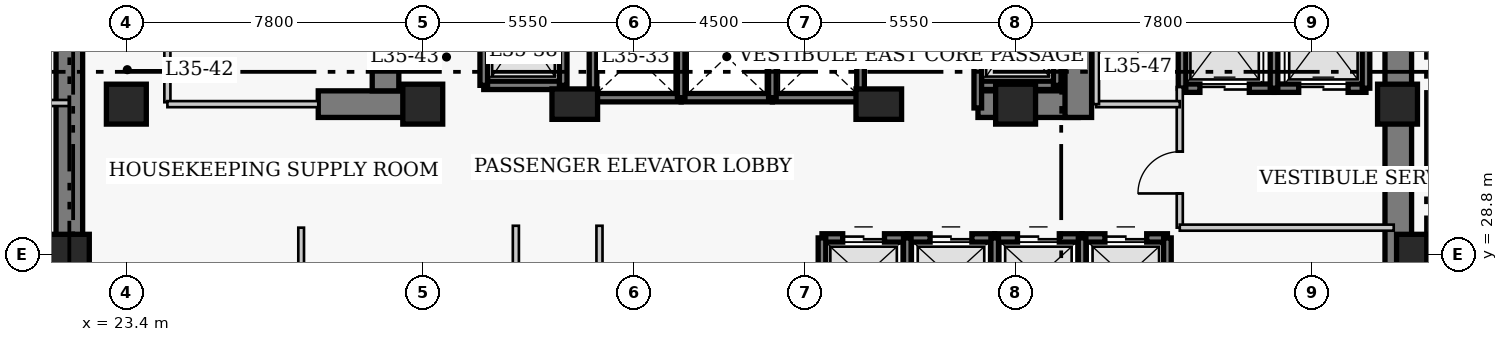
"""IFC4 building model, lengths in metres.
Left out: names, types, materials, properties, quantities, classifications, styles, units other than length and angle.
Written with IfcOpenShell. Run it as: python <this file> out.ifc"""

import sys

from ifc_helpers import new_model, si_unit, direction, frame, frame_2d, origin, origin_2d, place, context, subcontext, project, spatial, rectangle, extrude, element, fill, save


model = new_model("IFC4")
c1 = context("Model", 3, precision=1e-05, world=origin(), true_north=direction((0.0, 1.0)))
c2 = subcontext(c1, "Body", "Model", "MODEL_VIEW")
j1 = project(units=[si_unit("LENGTHUNIT", "METRE"), si_unit("PLANEANGLEUNIT", "RADIAN")], contexts=[c1])
p1 = place(None, origin())
s1 = spatial("IfcSite", under=j1, at=p1, CompositionType="ELEMENT")
p2 = place(p1, origin())
s2 = spatial("IfcBuilding", under=s1, at=p2, CompositionType="ELEMENT")
p3 = place(p2, frame((0.0, 0.0, 142.2)))
s3 = spatial("IfcBuildingStorey", under=s2, at=p3, CompositionType="ELEMENT", Elevation=142.2)
for number, where, z_axis, x_axis in (
    (1, (21.9, 27.05, 0.0), (0.0, 0.0, 1.0), (0.0, 1.0, 0.0)),
    (2, (56.87, 27.05, 0.0), (0.0, 0.0, 1.0), (0.0, 1.0, 0.0)),
):
    element("IfcWall", number, at=place(p3, frame(where, z_axis=z_axis, x_axis=x_axis)), inside=s3, PredefinedType="SHEAR", context=c2, shape_type="SweptSolid", body=[
        extrude(rectangle(XDim=13.62, YDim=0.7, at=frame_2d((6.81, 0.0))), origin(), (0.0, 0.0, 1.0), 3.8),
    ])
p4 = place(p3, frame((28.45, 32.75, 0.0), z_axis=(0.0, 0.0, 1.0), x_axis=(1.0, 0.0, 0.0)))
e3 = element("IfcWall", 3, at=p4, inside=s3, PredefinedType="SHEAR", context=c2, shape_type="SweptSolid", body=[
    extrude(rectangle(XDim=2.4, YDim=0.7, at=frame_2d((1.2, 0.0))), origin(), (0.0, 0.0, 1.0), 3.8),
])
p5 = place(p3, frame((45.81, 32.75, 0.0), z_axis=(0.0, 0.0, 1.0), x_axis=(1.0, 0.0, 0.0)))
e4 = element("IfcWall", 4, at=p5, inside=s3, PredefinedType="SHEAR", context=c2, shape_type="SweptSolid", body=[
    extrude(rectangle(XDim=2.64, YDim=0.7, at=frame_2d((1.32, 0.0))), origin(), (0.0, 0.0, 1.0), 3.8),
])
p6 = place(p3, frame((30.22, 33.1, 0.0), z_axis=(0.0, 0.0, 1.0), x_axis=(0.0, 1.0, 0.0)))
e5 = element("IfcWall", 5, at=p6, inside=s3, PredefinedType="SHEAR", context=c2, shape_type="SweptSolid", body=[
    extrude(rectangle(XDim=7.22, YDim=0.7, at=frame_2d((3.61, 0.0))), origin(), (0.0, 0.0, 1.0), 3.8),
])
p7 = place(p3, frame((48.45, 32.4, 0.0), z_axis=(0.0, 0.0, 1.0), x_axis=(0.0, 1.0, 0.0)))
e6 = element("IfcWall", 6, at=p7, inside=s3, PredefinedType="SHEAR", context=c2, shape_type="SweptSolid", body=[
    extrude(rectangle(XDim=7.92, YDim=0.7, at=frame_2d((3.96, 0.0))), origin(), (0.0, 0.0, 1.0), 3.8),
])
p8 = place(p7, frame((5.8, 0.0, 0.0)))
e7 = element("IfcOpeningElement", 7, at=p8, cuts=e6, PredefinedType="OPENING", context=c2, shape_type="SweptSolid", body=[
    extrude(rectangle(XDim=1.1, YDim=2.15, at=frame_2d((0.55, 1.075))), frame((0.0, 0.36, 0.0), z_axis=(0.0, -1.0, 0.0), x_axis=(1.0, 0.0, 0.0)), (0.0, 0.0, 1.0), 0.72),
])
for number, where, z_axis, x_axis in (
    (8, (21.9, 28.8, 0.0), (0.0, 0.0, 1.0), (1.0, 0.0, 0.0)),
    (9, (57.35, 28.8, 0.0), (0.0, 0.0, 1.0), (1.0, 0.0, 0.0)),
    (10, (23.4, 32.75, 0.0), (0.0, 0.0, 1.0), (1.0, 0.0, 0.0)),
    (11, (31.2, 32.75, 0.0), (0.0, 0.0, 1.0), (1.0, 0.0, 0.0)),
):
    element("IfcColumn", number, at=place(p3, frame(where, z_axis=z_axis, x_axis=x_axis)), inside=s3, PredefinedType="COLUMN", context=c2, shape_type="SweptSolid", body=[
        extrude(rectangle(XDim=1.05, YDim=1.05, at=origin_2d()), origin(), (0.0, 0.0, 1.0), 3.8),
    ])
for number, where, z_axis, x_axis in (
    (12, (35.2, 32.75, 0.0), (0.0, 0.0, 1.0), (1.0, 0.0, 0.0)),
    (13, (43.2, 32.75, 0.0), (0.0, 0.0, 1.0), (1.0, 0.0, 0.0)),
):
    element("IfcColumn", number, at=place(p3, frame(where, z_axis=z_axis, x_axis=x_axis)), inside=s3, PredefinedType="COLUMN", context=c2, shape_type="SweptSolid", body=[
        extrude(rectangle(XDim=1.2, YDim=0.8, at=origin_2d()), origin(), (0.0, 0.0, 1.0), 3.8),
    ])
for number, where, z_axis, x_axis in (
    (14, (46.8, 32.75, 0.0), (0.0, 0.0, 1.0), (1.0, 0.0, 0.0)),
    (15, (56.85, 32.75, 0.0), (0.0, 0.0, 1.0), (1.0, 0.0, 0.0)),
):
    element("IfcColumn", number, at=place(p3, frame(where, z_axis=z_axis, x_axis=x_axis)), inside=s3, PredefinedType="COLUMN", context=c2, shape_type="SweptSolid", body=[
        extrude(rectangle(XDim=1.05, YDim=1.05, at=origin_2d()), origin(), (0.0, 0.0, 1.0), 3.8),
    ])
p9 = place(p3, frame((41.705, 29.23, 0.0), z_axis=(0.0, 0.0, 1.0), x_axis=(1.0, 0.0, 0.0)))
e16 = element("IfcWall", 16, at=p9, inside=s3, PredefinedType="SHEAR", context=c2, shape_type="SweptSolid", body=[
    extrude(rectangle(XDim=2.245, YDim=0.22, at=frame_2d((1.123, 0.0))), origin(), (0.0, 0.0, 1.0), 3.8),
])
p10 = place(p9, frame((0.545, 0.0, 0.0)))
e17 = element("IfcOpeningElement", 17, at=p10, cuts=e16, PredefinedType="OPENING", context=c2, shape_type="SweptSolid", body=[
    extrude(rectangle(XDim=1.1, YDim=2.15, at=frame_2d((0.55, 1.075))), frame((0.0, 0.12, 0.0), z_axis=(0.0, -1.0, 0.0), x_axis=(1.0, 0.0, 0.0)), (0.0, 0.0, 1.0), 0.24),
])
p11 = place(p3, frame((41.705, 27.17, 0.0), z_axis=(0.0, 0.0, 1.0), x_axis=(0.0, 1.0, 0.0)))
e18 = element("IfcWall", 18, at=p11, inside=s3, PredefinedType="SHEAR", context=c2, shape_type="SweptSolid", body=[
    extrude(rectangle(XDim=2.06, YDim=0.2, at=frame_2d((1.03, 0.0))), origin(), (0.0, 0.0, 1.0), 3.8),
])
p12 = place(p3, frame((43.95, 29.23, 0.0), z_axis=(0.0, 0.0, 1.0), x_axis=(1.0, 0.0, 0.0)))
e19 = element("IfcWall", 19, at=p12, inside=s3, PredefinedType="SHEAR", context=c2, shape_type="SweptSolid", body=[
    extrude(rectangle(XDim=2.3, YDim=0.22, at=frame_2d((1.15, 0.0))), origin(), (0.0, 0.0, 1.0), 3.8),
])
p13 = place(p12, frame((0.6, 0.0, 0.0)))
e20 = element("IfcOpeningElement", 20, at=p13, cuts=e19, PredefinedType="OPENING", context=c2, shape_type="SweptSolid", body=[
    extrude(rectangle(XDim=1.1, YDim=2.15, at=frame_2d((0.55, 1.075))), frame((0.0, 0.12, 0.0), z_axis=(0.0, -1.0, 0.0), x_axis=(1.0, 0.0, 0.0)), (0.0, 0.0, 1.0), 0.24),
])
p14 = place(p3, frame((43.95, 27.17, 0.0), z_axis=(0.0, 0.0, 1.0), x_axis=(0.0, 1.0, 0.0)))
e21 = element("IfcWall", 21, at=p14, inside=s3, PredefinedType="SHEAR", context=c2, shape_type="SweptSolid", body=[
    extrude(rectangle(XDim=2.06, YDim=0.2, at=frame_2d((1.03, 0.0))), origin(), (0.0, 0.0, 1.0), 3.8),
])
p15 = place(p3, frame((46.25, 29.23, 0.0), z_axis=(0.0, 0.0, 1.0), x_axis=(1.0, 0.0, 0.0)))
e22 = element("IfcWall", 22, at=p15, inside=s3, PredefinedType="SHEAR", context=c2, shape_type="SweptSolid", body=[
    extrude(rectangle(XDim=2.3, YDim=0.22, at=frame_2d((1.15, 0.0))), origin(), (0.0, 0.0, 1.0), 3.8),
])
p16 = place(p15, frame((0.6, 0.0, 0.0)))
e23 = element("IfcOpeningElement", 23, at=p16, cuts=e22, PredefinedType="OPENING", context=c2, shape_type="SweptSolid", body=[
    extrude(rectangle(XDim=1.1, YDim=2.15, at=frame_2d((0.55, 1.075))), frame((0.0, 0.12, 0.0), z_axis=(0.0, -1.0, 0.0), x_axis=(1.0, 0.0, 0.0)), (0.0, 0.0, 1.0), 0.24),
])
p17 = place(p3, frame((46.25, 27.17, 0.0), z_axis=(0.0, 0.0, 1.0), x_axis=(0.0, 1.0, 0.0)))
e24 = element("IfcWall", 24, at=p17, inside=s3, PredefinedType="SHEAR", context=c2, shape_type="SweptSolid", body=[
    extrude(rectangle(XDim=2.06, YDim=0.2, at=frame_2d((1.03, 0.0))), origin(), (0.0, 0.0, 1.0), 3.8),
])
p18 = place(p3, frame((48.55, 29.23, 0.0), z_axis=(0.0, 0.0, 1.0), x_axis=(1.0, 0.0, 0.0)))
e25 = element("IfcWall", 25, at=p18, inside=s3, PredefinedType="SHEAR", context=c2, shape_type="SweptSolid", body=[
    extrude(rectangle(XDim=2.245, YDim=0.22, at=frame_2d((1.123, 0.0))), origin(), (0.0, 0.0, 1.0), 3.8),
])
p19 = place(p18, frame((0.6, 0.0, 0.0)))
e26 = element("IfcOpeningElement", 26, at=p19, cuts=e25, PredefinedType="OPENING", context=c2, shape_type="SweptSolid", body=[
    extrude(rectangle(XDim=1.1, YDim=2.15, at=frame_2d((0.55, 1.075))), frame((0.0, 0.12, 0.0), z_axis=(0.0, -1.0, 0.0), x_axis=(1.0, 0.0, 0.0)), (0.0, 0.0, 1.0), 0.24),
])
for number, where, z_axis, x_axis in (
    (27, (48.55, 27.17, 0.0), (0.0, 0.0, 1.0), (0.0, 1.0, 0.0)),
    (28, (50.795, 27.17, 0.0), (0.0, 0.0, 1.0), (0.0, 1.0, 0.0)),
):
    element("IfcWall", number, at=place(p3, frame(where, z_axis=z_axis, x_axis=x_axis)), inside=s3, PredefinedType="SHEAR", context=c2, shape_type="SweptSolid", body=[
        extrude(rectangle(XDim=2.06, YDim=0.2, at=frame_2d((1.03, 0.0))), origin(), (0.0, 0.0, 1.0), 3.8),
    ])
p20 = place(p3, frame((35.68, 32.92, 0.0), z_axis=(0.0, 0.0, 1.0), x_axis=(1.0, 0.0, 0.0)))
e29 = element("IfcWall", 29, at=p20, inside=s3, PredefinedType="SHEAR", context=c2, shape_type="SweptSolid", body=[
    extrude(rectangle(XDim=2.32, YDim=0.22, at=frame_2d((1.16, 0.0))), origin(), (0.0, 0.0, 1.0), 3.8),
])
p21 = place(p3, frame((35.68, 32.92, 0.0), z_axis=(0.0, 0.0, 1.0), x_axis=(0.0, 1.0, 0.0)))
e30 = element("IfcWall", 30, at=p21, inside=s3, PredefinedType="SHEAR", context=c2, shape_type="SweptSolid", body=[
    extrude(rectangle(XDim=2.16, YDim=0.2, at=frame_2d((1.08, 0.0))), origin(), (0.0, 0.0, 1.0), 3.8),
])
p22 = place(p3, frame((38.0, 32.92, 0.0), z_axis=(0.0, 0.0, 1.0), x_axis=(1.0, 0.0, 0.0)))
e31 = element("IfcWall", 31, at=p22, inside=s3, PredefinedType="SHEAR", context=c2, shape_type="SweptSolid", body=[
    extrude(rectangle(XDim=2.4, YDim=0.22, at=frame_2d((1.2, 0.0))), origin(), (0.0, 0.0, 1.0), 3.8),
])
p23 = place(p3, frame((38.0, 32.92, 0.0), z_axis=(0.0, 0.0, 1.0), x_axis=(0.0, 1.0, 0.0)))
e32 = element("IfcWall", 32, at=p23, inside=s3, PredefinedType="SHEAR", context=c2, shape_type="SweptSolid", body=[
    extrude(rectangle(XDim=2.16, YDim=0.2, at=frame_2d((1.08, 0.0))), origin(), (0.0, 0.0, 1.0), 3.8),
])
p24 = place(p3, frame((40.4, 32.92, 0.0), z_axis=(0.0, 0.0, 1.0), x_axis=(1.0, 0.0, 0.0)))
e33 = element("IfcWall", 33, at=p24, inside=s3, PredefinedType="SHEAR", context=c2, shape_type="SweptSolid", body=[
    extrude(rectangle(XDim=2.32, YDim=0.22, at=frame_2d((1.16, 0.0))), origin(), (0.0, 0.0, 1.0), 3.8),
])
for number, where, z_axis, x_axis in (
    (34, (40.4, 32.92, 0.0), (0.0, 0.0, 1.0), (0.0, 1.0, 0.0)),
    (35, (42.72, 32.92, 0.0), (0.0, 0.0, 1.0), (0.0, 1.0, 0.0)),
):
    element("IfcWall", number, at=place(p3, frame(where, z_axis=z_axis, x_axis=x_axis)), inside=s3, PredefinedType="SHEAR", context=c2, shape_type="SweptSolid", body=[
        extrude(rectangle(XDim=2.16, YDim=0.2, at=frame_2d((1.08, 0.0))), origin(), (0.0, 0.0, 1.0), 3.8),
    ])
p25 = place(p3, frame((51.18, 33.17, 0.0), z_axis=(0.0, 0.0, 1.0), x_axis=(1.0, 0.0, 0.0)))
e36 = element("IfcWall", 36, at=p25, inside=s3, PredefinedType="SHEAR", context=c2, shape_type="SweptSolid", body=[
    extrude(rectangle(XDim=2.42, YDim=0.22, at=frame_2d((1.21, 0.0))), origin(), (0.0, 0.0, 1.0), 3.8),
])
p26 = place(p25, frame((0.47, 0.0, 0.0)))
e37 = element("IfcOpeningElement", 37, at=p26, cuts=e36, PredefinedType="OPENING", context=c2, shape_type="SweptSolid", body=[
    extrude(rectangle(XDim=1.3, YDim=2.15, at=frame_2d((0.65, 1.075))), frame((0.0, 0.12, 0.0), z_axis=(0.0, -1.0, 0.0), x_axis=(1.0, 0.0, 0.0)), (0.0, 0.0, 1.0), 0.24),
])
p27 = place(p3, frame((51.18, 33.17, 0.0), z_axis=(0.0, 0.0, 1.0), x_axis=(0.0, 1.0, 0.0)))
e38 = element("IfcWall", 38, at=p27, inside=s3, PredefinedType="SHEAR", context=c2, shape_type="SweptSolid", body=[
    extrude(rectangle(XDim=2.86, YDim=0.2, at=frame_2d((1.43, 0.0))), origin(), (0.0, 0.0, 1.0), 3.8),
])
p28 = place(p3, frame((53.6, 33.17, 0.0), z_axis=(0.0, 0.0, 1.0), x_axis=(1.0, 0.0, 0.0)))
e39 = element("IfcWall", 39, at=p28, inside=s3, PredefinedType="SHEAR", context=c2, shape_type="SweptSolid", body=[
    extrude(rectangle(XDim=2.42, YDim=0.22, at=frame_2d((1.21, 0.0))), origin(), (0.0, 0.0, 1.0), 3.8),
])
p29 = place(p28, frame((0.65, 0.0, 0.0)))
e40 = element("IfcOpeningElement", 40, at=p29, cuts=e39, PredefinedType="OPENING", context=c2, shape_type="SweptSolid", body=[
    extrude(rectangle(XDim=1.3, YDim=2.15, at=frame_2d((0.65, 1.075))), frame((0.0, 0.12, 0.0), z_axis=(0.0, -1.0, 0.0), x_axis=(1.0, 0.0, 0.0)), (0.0, 0.0, 1.0), 0.24),
])
for number, where, z_axis, x_axis in (
    (41, (53.6, 33.17, 0.0), (0.0, 0.0, 1.0), (0.0, 1.0, 0.0)),
    (42, (56.02, 33.17, 0.0), (0.0, 0.0, 1.0), (0.0, 1.0, 0.0)),
):
    element("IfcWall", number, at=place(p3, frame(where, z_axis=z_axis, x_axis=x_axis)), inside=s3, PredefinedType="SHEAR", context=c2, shape_type="SweptSolid", body=[
        extrude(rectangle(XDim=2.86, YDim=0.2, at=frame_2d((1.43, 0.0))), origin(), (0.0, 0.0, 1.0), 3.8),
    ])
p30 = place(p3, frame((32.805, 33.245, 0.0), z_axis=(0.0, 0.0, 1.0), x_axis=(1.0, 0.0, 0.0)))
e43 = element("IfcWall", 43, at=p30, inside=s3, PredefinedType="SHEAR", context=c2, shape_type="SweptSolid", body=[
    extrude(rectangle(XDim=2.09, YDim=0.22, at=frame_2d((1.045, 0.0))), origin(), (0.0, 0.0, 1.0), 3.8),
])
for number, where, z_axis, x_axis in (
    (44, (32.805, 33.245, 0.0), (0.0, 0.0, 1.0), (0.0, 1.0, 0.0)),
    (45, (34.895, 33.245, 0.0), (0.0, 0.0, 1.0), (0.0, 1.0, 0.0)),
):
    element("IfcWall", number, at=place(p3, frame(where, z_axis=z_axis, x_axis=x_axis)), inside=s3, PredefinedType="SHEAR", context=c2, shape_type="SweptSolid", body=[
        extrude(rectangle(XDim=2.91, YDim=0.2, at=frame_2d((1.455, 0.0))), origin(), (0.0, 0.0, 1.0), 3.8),
    ])
p31 = place(p3, frame((45.805, 33.245, 0.0), z_axis=(0.0, 0.0, 1.0), x_axis=(1.0, 0.0, 0.0)))
e46 = element("IfcWall", 46, at=p31, inside=s3, PredefinedType="SHEAR", context=c2, shape_type="SweptSolid", body=[
    extrude(rectangle(XDim=2.09, YDim=0.22, at=frame_2d((1.045, 0.0))), origin(), (0.0, 0.0, 1.0), 3.8),
])
p32 = place(p3, frame((45.805, 32.65, 0.0), z_axis=(0.0, 0.0, 1.0), x_axis=(0.0, 1.0, 0.0)))
e47 = element("IfcWall", 47, at=p32, inside=s3, PredefinedType="SHEAR", context=c2, shape_type="SweptSolid", body=[
    extrude(rectangle(XDim=3.505, YDim=0.2, at=frame_2d((1.752, 0.0))), origin(), (0.0, 0.0, 1.0), 3.8),
])
p33 = place(p3, frame((47.895, 33.245, 0.0), z_axis=(0.0, 0.0, 1.0), x_axis=(0.0, 1.0, 0.0)))
e48 = element("IfcWall", 48, at=p33, inside=s3, PredefinedType="SHEAR", context=c2, shape_type="SweptSolid", body=[
    extrude(rectangle(XDim=2.91, YDim=0.2, at=frame_2d((1.455, 0.0))), origin(), (0.0, 0.0, 1.0), 3.8),
])
p34 = place(p3, frame((24.48, 32.8, 0.0), z_axis=(0.0, 0.0, 1.0), x_axis=(0.0, 1.0, 0.0)))
e49 = element("IfcWall", 49, at=p34, inside=s3, PredefinedType="PARTITIONING", context=c2, shape_type="SweptSolid", body=[
    extrude(rectangle(XDim=3.57, YDim=0.16, at=frame_2d((1.785, 0.0))), origin(), (0.0, 0.0, 1.0), 3.55),
])
p35 = place(p34, frame((1.604, 0.0, 0.0)))
e50 = element("IfcOpeningElement", 50, at=p35, cuts=e49, PredefinedType="OPENING", context=c2, shape_type="SweptSolid", body=[
    extrude(rectangle(XDim=0.9, YDim=2.1, at=frame_2d((0.45, 1.05))), frame((0.0, 0.09, 0.0), z_axis=(0.0, -1.0, 0.0), x_axis=(1.0, 0.0, 0.0)), (0.0, 0.0, 1.0), 0.18),
])
p36 = place(p3, frame((51.12, 29.5, 0.0), z_axis=(0.0, 0.0, 1.0), x_axis=(0.0, 1.0, 0.0)))
e51 = element("IfcWall", 51, at=p36, inside=s3, PredefinedType="PARTITIONING", context=c2, shape_type="SweptSolid", body=[
    extrude(rectangle(XDim=3.7, YDim=0.16, at=frame_2d((1.85, 0.0))), origin(), (0.0, 0.0, 1.0), 3.55),
])
p37 = place(p36, frame((0.9, 0.0, 0.0)))
e52 = element("IfcOpeningElement", 52, at=p37, cuts=e51, PredefinedType="OPENING", context=c2, shape_type="SweptSolid", body=[
    extrude(rectangle(XDim=1.1, YDim=2.15, at=frame_2d((0.55, 1.075))), frame((0.0, 0.09, 0.0), z_axis=(0.0, -1.0, 0.0), x_axis=(1.0, 0.0, 0.0)), (0.0, 0.0, 1.0), 0.18),
])
p38 = place(p3, frame((51.12, 29.5, 0.0), z_axis=(0.0, 0.0, 1.0), x_axis=(1.0, 0.0, 0.0)))
e53 = element("IfcWall", 53, at=p38, inside=s3, PredefinedType="PARTITIONING", context=c2, shape_type="SweptSolid", body=[
    extrude(rectangle(XDim=5.63, YDim=0.16, at=frame_2d((2.815, 0.0))), origin(), (0.0, 0.0, 1.0), 3.55),
])
p39 = place(p3, frame((24.48, 32.75, 0.0), z_axis=(0.0, 0.0, 1.0), x_axis=(1.0, 0.0, 0.0)))
e54 = element("IfcWall", 54, at=p39, inside=s3, PredefinedType="PARTITIONING", context=c2, shape_type="SweptSolid", body=[
    extrude(rectangle(XDim=3.97, YDim=0.16, at=frame_2d((1.985, 0.0))), origin(), (0.0, 0.0, 1.0), 3.55),
])
p40 = place(p3, frame((48.92, 32.75, 0.0), z_axis=(0.0, 0.0, 1.0), x_axis=(1.0, 0.0, 0.0)))
e55 = element("IfcWall", 55, at=p40, inside=s3, PredefinedType="PARTITIONING", context=c2, shape_type="SweptSolid", body=[
    extrude(rectangle(XDim=2.2, YDim=0.16, at=frame_2d((1.1, 0.0))), origin(), (0.0, 0.0, 1.0), 3.55),
])
p41 = place(p3, frame((48.92, 32.75, 0.0), z_axis=(0.0, 0.0, 1.0), x_axis=(0.0, 1.0, 0.0)))
e56 = element("IfcWall", 56, at=p41, inside=s3, PredefinedType="PARTITIONING", context=c2, shape_type="SweptSolid", body=[
    extrude(rectangle(XDim=3.62, YDim=0.15, at=frame_2d((1.81, 0.0))), origin(), (0.0, 0.0, 1.0), 3.55),
])
for number, where, z_axis, x_axis in (
    (57, (33.65, 16.66, 0.0), (0.0, 0.0, 1.0), (0.0, 1.0, 0.0)),
    (58, (35.85, 16.66, 0.0), (0.0, 0.0, 1.0), (0.0, 1.0, 0.0)),
):
    element("IfcWall", number, at=place(p3, frame(where, z_axis=z_axis, x_axis=x_axis)), inside=s3, PredefinedType="PARTITIONING", context=c2, shape_type="SweptSolid", body=[
        extrude(rectangle(XDim=12.89, YDim=0.16, at=frame_2d((6.445, 0.0))), origin(), (0.0, 0.0, 1.0), 3.55),
    ])
p42 = place(p3, frame((20.46, 32.78, 0.0), z_axis=(0.0, 0.0, 1.0), x_axis=(1.0, 0.0, 0.0)))
e59 = element("IfcWall", 59, at=p42, inside=s3, PredefinedType="PARTITIONING", context=c2, shape_type="SweptSolid", body=[
    extrude(rectangle(XDim=1.44, YDim=0.16, at=frame_2d((0.72, 0.0))), origin(), (0.0, 0.0, 1.0), 3.55),
])
p43 = place(p3, frame((28.0, 16.66, 0.0), z_axis=(0.0, 0.0, 1.0), x_axis=(0.0, 1.0, 0.0)))
e60 = element("IfcWall", 60, at=p43, inside=s3, PredefinedType="PARTITIONING", context=c2, shape_type="SweptSolid", body=[
    extrude(rectangle(XDim=12.84, YDim=0.15, at=frame_2d((6.42, 0.0))), origin(), (0.0, 0.0, 1.0), 3.55),
])
p44 = place(p10, origin())
e61 = element("IfcDoor", 61, at=p44, inside=s3, OperationType="DOUBLE_DOOR_SLIDING", PredefinedType="DOOR", context=c2, shape_type="SweptSolid", body=[
    extrude(rectangle(XDim=1.1, YDim=2.15, at=frame_2d((0.55, 1.075))), frame((0.0, 0.025, 0.0), z_axis=(0.0, -1.0, 0.0), x_axis=(1.0, 0.0, 0.0)), (0.0, 0.0, 1.0), 0.05),
])
fill(e17, e61)
p45 = place(p13, origin())
e62 = element("IfcDoor", 62, at=p45, inside=s3, OperationType="DOUBLE_DOOR_SLIDING", PredefinedType="DOOR", context=c2, shape_type="SweptSolid", body=[
    extrude(rectangle(XDim=1.1, YDim=2.15, at=frame_2d((0.55, 1.075))), frame((0.0, 0.025, 0.0), z_axis=(0.0, -1.0, 0.0), x_axis=(1.0, 0.0, 0.0)), (0.0, 0.0, 1.0), 0.05),
])
fill(e20, e62)
p46 = place(p16, origin())
e63 = element("IfcDoor", 63, at=p46, inside=s3, OperationType="DOUBLE_DOOR_SLIDING", PredefinedType="DOOR", context=c2, shape_type="SweptSolid", body=[
    extrude(rectangle(XDim=1.1, YDim=2.15, at=frame_2d((0.55, 1.075))), frame((0.0, 0.025, 0.0), z_axis=(0.0, -1.0, 0.0), x_axis=(1.0, 0.0, 0.0)), (0.0, 0.0, 1.0), 0.05),
])
fill(e23, e63)
p47 = place(p19, origin())
e64 = element("IfcDoor", 64, at=p47, inside=s3, OperationType="DOUBLE_DOOR_SLIDING", PredefinedType="DOOR", context=c2, shape_type="SweptSolid", body=[
    extrude(rectangle(XDim=1.1, YDim=2.15, at=frame_2d((0.55, 1.075))), frame((0.0, 0.025, 0.0), z_axis=(0.0, -1.0, 0.0), x_axis=(1.0, 0.0, 0.0)), (0.0, 0.0, 1.0), 0.05),
])
fill(e26, e64)
p48 = place(p26, origin())
e65 = element("IfcDoor", 65, at=p48, inside=s3, OperationType="DOUBLE_DOOR_SLIDING", PredefinedType="DOOR", context=c2, shape_type="SweptSolid", body=[
    extrude(rectangle(XDim=1.3, YDim=2.15, at=frame_2d((0.65, 1.075))), frame((0.0, 0.025, 0.0), z_axis=(0.0, -1.0, 0.0), x_axis=(1.0, 0.0, 0.0)), (0.0, 0.0, 1.0), 0.05),
])
fill(e37, e65)
p49 = place(p29, origin())
e66 = element("IfcDoor", 66, at=p49, inside=s3, OperationType="DOUBLE_DOOR_SLIDING", PredefinedType="DOOR", context=c2, shape_type="SweptSolid", body=[
    extrude(rectangle(XDim=1.3, YDim=2.15, at=frame_2d((0.65, 1.075))), frame((0.0, 0.025, 0.0), z_axis=(0.0, -1.0, 0.0), x_axis=(1.0, 0.0, 0.0)), (0.0, 0.0, 1.0), 0.05),
])
fill(e40, e66)
p50 = place(p37, origin())
e67 = element("IfcDoor", 67, at=p50, inside=s3, OperationType="SINGLE_SWING_LEFT", PredefinedType="DOOR", context=c2, shape_type="SweptSolid", body=[
    extrude(rectangle(XDim=1.1, YDim=2.15, at=frame_2d((0.55, 1.075))), frame((0.0, 0.025, 0.0), z_axis=(0.0, -1.0, 0.0), x_axis=(1.0, 0.0, 0.0)), (0.0, 0.0, 1.0), 0.05),
])
fill(e52, e67)
save(model, sys.argv[1])
